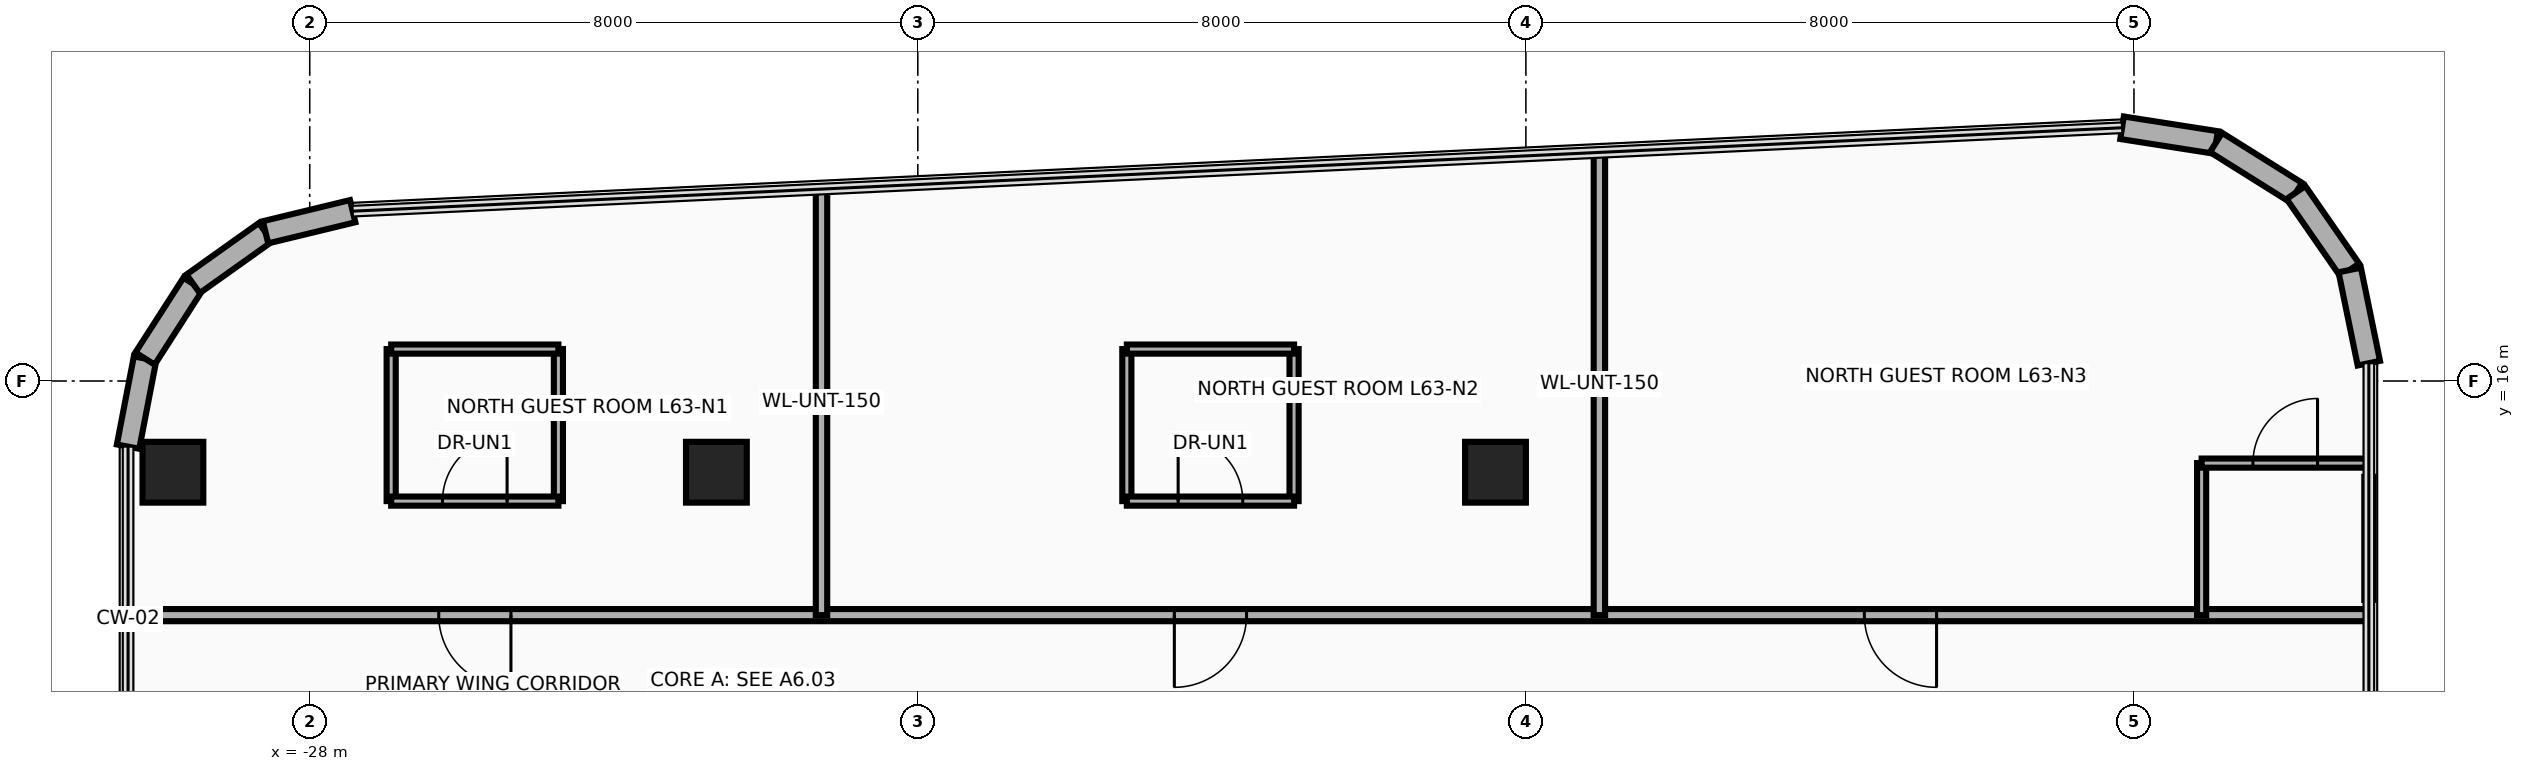
"""IFC4 building model, lengths in metres.
Left out: names, types, materials, properties, quantities, classifications, styles, units other than length and angle.
Written with IfcOpenShell. Run it as: python <this file> out.ifc"""

import sys

from ifc_helpers import new_model, si_unit, direction, frame, frame_2d, origin, origin_2d, place, context, subcontext, project, spatial, rectangle, extrude, source, transform, mapped, element, fill, save


model = new_model("IFC4")
c1 = context("Model", 3, precision=1e-05, world=origin(), true_north=direction((0.0, 1.0)))
c2 = subcontext(c1, "Body", "Model", "MODEL_VIEW")
j1 = project(units=[si_unit("LENGTHUNIT", "METRE"), si_unit("PLANEANGLEUNIT", "RADIAN")], contexts=[c1])
p1 = place(None, origin())
s1 = spatial("IfcSite", under=j1, at=p1, CompositionType="ELEMENT")
p2 = place(p1, origin())
s2 = spatial("IfcBuilding", under=s1, at=p2, CompositionType="ELEMENT")
p3 = place(p2, frame((0.0, 0.0, 244.0)))
s3 = spatial("IfcBuildingStorey", under=s2, at=p3, CompositionType="ELEMENT", Elevation=244.0)
m1 = source(origin(), c2, "Body", "SweptSolid", [
    extrude(rectangle(XDim=0.8, YDim=0.8, at=origin_2d()), origin(), (0.0, 0.0, 1.0), 3.5),
])
for number, where, z_axis, x_axis in (
    (1, (-29.8, 14.8, 0.0), (0.0, 0.0, 1.0), (1.0, 0.0, 0.0)),
    (2, (-22.65, 14.8, 0.0), (0.0, 0.0, 1.0), (1.0, 0.0, 0.0)),
    (3, (-12.4, 14.8, 0.0), (0.0, 0.0, 1.0), (1.0, 0.0, 0.0)),
):
    element("IfcColumn", number, at=place(p3, frame(where, z_axis=z_axis, x_axis=x_axis)), inside=s3, PredefinedType="COLUMN", context=c2, shape_type="MappedRepresentation", body=[
        mapped(m1, transform((0.0, 0.0, 0.0), x_axis=(1.0, 0.0, 0.0), y_axis=(0.0, 1.0, 0.0), z_axis=(0.0, 0.0, 1.0), scale=1.0)),
    ])
p4 = place(p3, frame((-30.39, 15.137, 0.0), z_axis=(0.0, 0.0, 1.0), x_axis=(0.189307792679, 0.981917796779, 0.0)))
e4 = element("IfcWall", 4, at=p4, inside=s3, PredefinedType="SOLIDWALL", context=c2, shape_type="SweptSolid", body=[
    extrude(rectangle(XDim=1.18, YDim=0.3, at=frame_2d((0.59, 0.0))), origin(), (0.0, 0.0, 1.0), 3.26),
])
p5 = place(p3, frame((-30.167, 16.295, 0.0), z_axis=(0.0, 0.0, 1.0), x_axis=(0.540842020947, 0.841124193195, 0.0)))
e5 = element("IfcWall", 5, at=p5, inside=s3, PredefinedType="SOLIDWALL", context=c2, shape_type="SweptSolid", body=[
    extrude(rectangle(XDim=1.169, YDim=0.3, at=frame_2d((0.584, 0.0))), origin(), (0.0, 0.0, 1.0), 3.26),
])
p6 = place(p3, frame((-29.534, 17.279, 0.0), z_axis=(0.0, 0.0, 1.0), x_axis=(0.81466371606, 0.579933642527, 0.0)))
e6 = element("IfcWall", 6, at=p6, inside=s3, PredefinedType="SOLIDWALL", context=c2, shape_type="SweptSolid", body=[
    extrude(rectangle(XDim=1.169, YDim=0.3, at=frame_2d((0.584, 0.0))), origin(), (0.0, 0.0, 1.0), 3.26),
])
p7 = place(p3, frame((-28.582, 17.957, 0.0), z_axis=(0.0, 0.0, 1.0), x_axis=(0.971929016595, 0.235274279725, 0.0)))
e7 = element("IfcWall", 7, at=p7, inside=s3, PredefinedType="SOLIDWALL", context=c2, shape_type="SweptSolid", body=[
    extrude(rectangle(XDim=1.18, YDim=0.3, at=frame_2d((0.59, 0.0))), origin(), (0.0, 0.0, 1.0), 3.26),
])
p8 = place(p3, frame((-4.157, 19.332, 0.0), z_axis=(0.0, 0.0, 1.0), x_axis=(0.987969236552, -0.15465053387, 0.0)))
e8 = element("IfcWall", 8, at=p8, inside=s3, PredefinedType="SOLIDWALL", context=c2, shape_type="SweptSolid", body=[
    extrude(rectangle(XDim=1.252, YDim=0.3, at=frame_2d((0.626, 0.0))), origin(), (0.0, 0.0, 1.0), 3.26),
])
for number, where, z_axis, x_axis in (
    (9, (-2.92, 19.138, 0.0), (0.0, 0.0, 1.0), (0.847, -0.531, 0.0)),
    (10, (-1.869, 18.48, 0.0), (0.0, 0.0, 1.0), (0.57, -0.822, 0.0)),
):
    element("IfcWall", number, at=place(p3, frame(where, z_axis=z_axis, x_axis=x_axis)), inside=s3, PredefinedType="SOLIDWALL", context=c2, shape_type="SweptSolid", body=[
        extrude(rectangle(XDim=1.24, YDim=0.3, at=frame_2d((0.62, 0.0))), origin(), (0.0, 0.0, 1.0), 3.26),
    ])
p9 = place(p3, frame((-1.161, 17.461, 0.0), z_axis=(0.0, 0.0, 1.0), x_axis=(0.20087696073, -0.979616479367, 0.0)))
e11 = element("IfcWall", 11, at=p9, inside=s3, PredefinedType="SOLIDWALL", context=c2, shape_type="SweptSolid", body=[
    extrude(rectangle(XDim=1.252, YDim=0.3, at=frame_2d((0.626, 0.0))), origin(), (0.0, 0.0, 1.0), 3.26),
])
p10 = place(p3, frame((-30.39, 12.92, 0.0), z_axis=(0.0, 0.0, 1.0), x_axis=(1.0, 0.0, 0.0)))
e12 = element("IfcWall", 12, at=p10, inside=s3, PredefinedType="PARTITIONING", context=c2, shape_type="SweptSolid", body=[
    extrude(rectangle(XDim=29.48, YDim=0.16, at=frame_2d((14.74, 0.0))), origin(), (0.0, 0.0, 1.0), 2.634),
])
p11 = place(p10, frame((4.087, 0.0, 0.0)))
e13 = element("IfcOpeningElement", 13, at=p11, cuts=e12, PredefinedType="OPENING", context=c2, shape_type="SweptSolid", body=[
    extrude(rectangle(XDim=0.95, YDim=2.15, at=frame_2d((0.475, 1.075))), frame((0.0, 0.095, 0.0), z_axis=(0.0, -1.0, 0.0), x_axis=(1.0, 0.0, 0.0)), (0.0, 0.0, 1.0), 0.19),
])
p12 = place(p10, frame((13.765, 0.0, 0.0)))
e14 = element("IfcOpeningElement", 14, at=p12, cuts=e12, PredefinedType="OPENING", context=c2, shape_type="SweptSolid", body=[
    extrude(rectangle(XDim=0.95, YDim=2.15, at=frame_2d((0.475, 1.075))), frame((0.0, 0.095, 0.0), z_axis=(0.0, -1.0, 0.0), x_axis=(1.0, 0.0, 0.0)), (0.0, 0.0, 1.0), 0.19),
])
p13 = place(p10, frame((22.843, 0.0, 0.0)))
e15 = element("IfcOpeningElement", 15, at=p13, cuts=e12, PredefinedType="OPENING", context=c2, shape_type="SweptSolid", body=[
    extrude(rectangle(XDim=0.95, YDim=2.15, at=frame_2d((0.475, 1.075))), frame((0.0, 0.095, 0.0), z_axis=(0.0, -1.0, 0.0), x_axis=(1.0, 0.0, 0.0)), (0.0, 0.0, 1.0), 0.19),
])
p14 = place(p3, frame((-21.267, 12.92, 0.0), z_axis=(0.0, 0.0, 1.0), x_axis=(0.0, 1.0, 0.0)))
e16 = element("IfcWall", 16, at=p14, inside=s3, PredefinedType="PARTITIONING", context=c2, shape_type="SweptSolid", body=[
    extrude(rectangle(XDim=5.605, YDim=0.15, at=frame_2d((2.803, 0.0))), origin(), (0.0, 0.0, 1.0), 2.544),
])
p15 = place(p3, frame((-11.033, 12.92, 0.0), z_axis=(0.0, 0.0, 1.0), x_axis=(0.0, 1.0, 0.0)))
e17 = element("IfcWall", 17, at=p15, inside=s3, PredefinedType="PARTITIONING", context=c2, shape_type="SweptSolid", body=[
    extrude(rectangle(XDim=6.088, YDim=0.15, at=frame_2d((3.044, 0.0))), origin(), (0.0, 0.0, 1.0), 3.26),
])
for number, where, z_axis, x_axis in (
    (18, (-26.928, 14.42, 0.0), (0.0, 0.0, 1.0), (0.0, 1.0, 0.0)),
    (19, (-24.729, 14.42, 0.0), (0.0, 0.0, 1.0), (0.0, 1.0, 0.0)),
):
    element("IfcWall", number, at=place(p3, frame(where, z_axis=z_axis, x_axis=x_axis)), inside=s3, PredefinedType="PARTITIONING", context=c2, shape_type="SweptSolid", body=[
        extrude(rectangle(XDim=2.0, YDim=0.12, at=frame_2d((1.0, 0.0))), origin(), (0.0, 0.0, 1.0), 2.544),
    ])
p16 = place(p3, frame((-26.928, 16.42, 0.0), z_axis=(0.0, 0.0, 1.0), x_axis=(1.0, 0.0, 0.0)))
e20 = element("IfcWall", 20, at=p16, inside=s3, PredefinedType="PARTITIONING", context=c2, shape_type="SweptSolid", body=[
    extrude(rectangle(XDim=2.2, YDim=0.12, at=frame_2d((1.1, 0.0))), origin(), (0.0, 0.0, 1.0), 3.26),
])
p17 = place(p3, frame((-26.928, 14.42, 0.0), z_axis=(0.0, 0.0, 1.0), x_axis=(1.0, 0.0, 0.0)))
e21 = element("IfcWall", 21, at=p17, inside=s3, PredefinedType="PARTITIONING", context=c2, shape_type="SweptSolid", body=[
    extrude(rectangle(XDim=2.2, YDim=0.12, at=frame_2d((1.1, 0.0))), origin(), (0.0, 0.0, 1.0), 3.26),
])
p18 = place(p17, frame((0.675, 0.0, 0.0)))
e22 = element("IfcOpeningElement", 22, at=p18, cuts=e21, PredefinedType="OPENING", context=c2, shape_type="SweptSolid", body=[
    extrude(rectangle(XDim=0.85, YDim=2.1, at=frame_2d((0.425, 1.05))), frame((0.0, 0.075, 0.0), z_axis=(0.0, -1.0, 0.0), x_axis=(1.0, 0.0, 0.0)), (0.0, 0.0, 1.0), 0.15),
])
for number, where, z_axis, x_axis in (
    (23, (-17.25, 14.42, 0.0), (0.0, 0.0, 1.0), (0.0, 1.0, 0.0)),
    (24, (-15.05, 14.42, 0.0), (0.0, 0.0, 1.0), (0.0, 1.0, 0.0)),
):
    element("IfcWall", number, at=place(p3, frame(where, z_axis=z_axis, x_axis=x_axis)), inside=s3, PredefinedType="PARTITIONING", context=c2, shape_type="SweptSolid", body=[
        extrude(rectangle(XDim=2.0, YDim=0.12, at=frame_2d((1.0, 0.0))), origin(), (0.0, 0.0, 1.0), 2.544),
    ])
p19 = place(p3, frame((-17.25, 16.42, 0.0), z_axis=(0.0, 0.0, 1.0), x_axis=(1.0, 0.0, 0.0)))
e25 = element("IfcWall", 25, at=p19, inside=s3, PredefinedType="PARTITIONING", context=c2, shape_type="SweptSolid", body=[
    extrude(rectangle(XDim=2.2, YDim=0.12, at=frame_2d((1.1, 0.0))), origin(), (0.0, 0.0, 1.0), 3.26),
])
p20 = place(p3, frame((-17.25, 14.42, 0.0), z_axis=(0.0, 0.0, 1.0), x_axis=(1.0, 0.0, 0.0)))
e26 = element("IfcWall", 26, at=p20, inside=s3, PredefinedType="PARTITIONING", context=c2, shape_type="SweptSolid", body=[
    extrude(rectangle(XDim=2.2, YDim=0.12, at=frame_2d((1.1, 0.0))), origin(), (0.0, 0.0, 1.0), 3.26),
])
p21 = place(p20, frame((0.675, 0.0, 0.0)))
e27 = element("IfcOpeningElement", 27, at=p21, cuts=e26, PredefinedType="OPENING", context=c2, shape_type="SweptSolid", body=[
    extrude(rectangle(XDim=0.85, YDim=2.1, at=frame_2d((0.425, 1.05))), frame((0.0, 0.075, 0.0), z_axis=(0.0, -1.0, 0.0), x_axis=(1.0, 0.0, 0.0)), (0.0, 0.0, 1.0), 0.15),
])
p22 = place(p3, frame((-3.11, 12.92, 0.0), z_axis=(0.0, 0.0, 1.0), x_axis=(0.0, 1.0, 0.0)))
e28 = element("IfcWall", 28, at=p22, inside=s3, PredefinedType="PARTITIONING", context=c2, shape_type="SweptSolid", body=[
    extrude(rectangle(XDim=2.0, YDim=0.12, at=frame_2d((1.0, 0.0))), origin(), (0.0, 0.0, 1.0), 3.26),
])
p23 = place(p3, frame((-3.11, 14.92, 0.0), z_axis=(0.0, 0.0, 1.0), x_axis=(1.0, 0.0, 0.0)))
e29 = element("IfcWall", 29, at=p23, inside=s3, PredefinedType="PARTITIONING", context=c2, shape_type="SweptSolid", body=[
    extrude(rectangle(XDim=2.2, YDim=0.12, at=frame_2d((1.1, 0.0))), origin(), (0.0, 0.0, 1.0), 3.26),
])
p24 = place(p23, frame((0.675, 0.0, 0.0)))
e30 = element("IfcOpeningElement", 30, at=p24, cuts=e29, PredefinedType="OPENING", context=c2, shape_type="SweptSolid", body=[
    extrude(rectangle(XDim=0.85, YDim=2.1, at=frame_2d((0.425, 1.05))), frame((0.0, 0.075, 0.0), z_axis=(0.0, -1.0, 0.0), x_axis=(1.0, 0.0, 0.0)), (0.0, 0.0, 1.0), 0.15),
])
p25 = place(p3, frame((-0.91, 13.12, 0.0), z_axis=(0.0, 0.0, 1.0), x_axis=(0.0, 1.0, 0.0)))
e31 = element("IfcWall", 31, at=p25, inside=s3, PredefinedType="PARTITIONING", context=c2, shape_type="SweptSolid", body=[
    extrude(rectangle(XDim=1.62, YDim=0.12, at=frame_2d((0.81, 0.0))), origin(), (0.0, 0.0, 1.0), 3.26),
])
p26 = place(p11, frame((0.95, 0.0, 0.0), z_axis=(0.0, 0.0, 1.0), x_axis=(-1.0, 0.0, 0.0)))
e32 = element("IfcDoor", 32, at=p26, inside=s3, OperationType="SINGLE_SWING_LEFT", PredefinedType="DOOR", context=c2, shape_type="SweptSolid", body=[
    extrude(rectangle(XDim=0.95, YDim=2.15, at=frame_2d((0.475, 1.075))), frame((0.0, 0.025, 0.0), z_axis=(0.0, -1.0, 0.0), x_axis=(1.0, 0.0, 0.0)), (0.0, 0.0, 1.0), 0.05),
])
fill(e13, e32)
p27 = place(p18, origin())
e33 = element("IfcDoor", 33, at=p27, inside=s3, OperationType="SINGLE_SWING_RIGHT", PredefinedType="DOOR", context=c2, shape_type="SweptSolid", body=[
    extrude(rectangle(XDim=0.85, YDim=2.1, at=frame_2d((0.425, 1.05))), frame((0.0, 0.025, 0.0), z_axis=(0.0, -1.0, 0.0), x_axis=(1.0, 0.0, 0.0)), (0.0, 0.0, 1.0), 0.05),
])
fill(e22, e33)
p28 = place(p12, frame((0.95, 0.0, 0.0), z_axis=(0.0, 0.0, 1.0), x_axis=(-1.0, 0.0, 0.0)))
e34 = element("IfcDoor", 34, at=p28, inside=s3, OperationType="SINGLE_SWING_LEFT", PredefinedType="DOOR", context=c2, shape_type="SweptSolid", body=[
    extrude(rectangle(XDim=0.95, YDim=2.15, at=frame_2d((0.475, 1.075))), frame((0.0, 0.025, 0.0), z_axis=(0.0, -1.0, 0.0), x_axis=(1.0, 0.0, 0.0)), (0.0, 0.0, 1.0), 0.05),
])
fill(e14, e34)
p29 = place(p21, origin())
e35 = element("IfcDoor", 35, at=p29, inside=s3, OperationType="SINGLE_SWING_RIGHT", PredefinedType="DOOR", context=c2, shape_type="SweptSolid", body=[
    extrude(rectangle(XDim=0.85, YDim=2.1, at=frame_2d((0.425, 1.05))), frame((0.0, 0.025, 0.0), z_axis=(0.0, -1.0, 0.0), x_axis=(1.0, 0.0, 0.0)), (0.0, 0.0, 1.0), 0.05),
])
fill(e27, e35)
p30 = place(p13, frame((0.95, 0.0, 0.0), z_axis=(0.0, 0.0, 1.0), x_axis=(-1.0, 0.0, 0.0)))
e36 = element("IfcDoor", 36, at=p30, inside=s3, OperationType="SINGLE_SWING_LEFT", PredefinedType="DOOR", context=c2, shape_type="SweptSolid", body=[
    extrude(rectangle(XDim=0.95, YDim=2.15, at=frame_2d((0.475, 1.075))), frame((0.0, 0.025, 0.0), z_axis=(0.0, -1.0, 0.0), x_axis=(1.0, 0.0, 0.0)), (0.0, 0.0, 1.0), 0.05),
])
fill(e15, e36)
p31 = place(p24, origin())
e37 = element("IfcDoor", 37, at=p31, inside=s3, OperationType="SINGLE_SWING_RIGHT", PredefinedType="DOOR", context=c2, shape_type="SweptSolid", body=[
    extrude(rectangle(XDim=0.85, YDim=2.1, at=frame_2d((0.425, 1.05))), frame((0.0, 0.025, 0.0), z_axis=(0.0, -1.0, 0.0), x_axis=(1.0, 0.0, 0.0)), (0.0, 0.0, 1.0), 0.05),
])
fill(e30, e37)
save(model, sys.argv[1])
